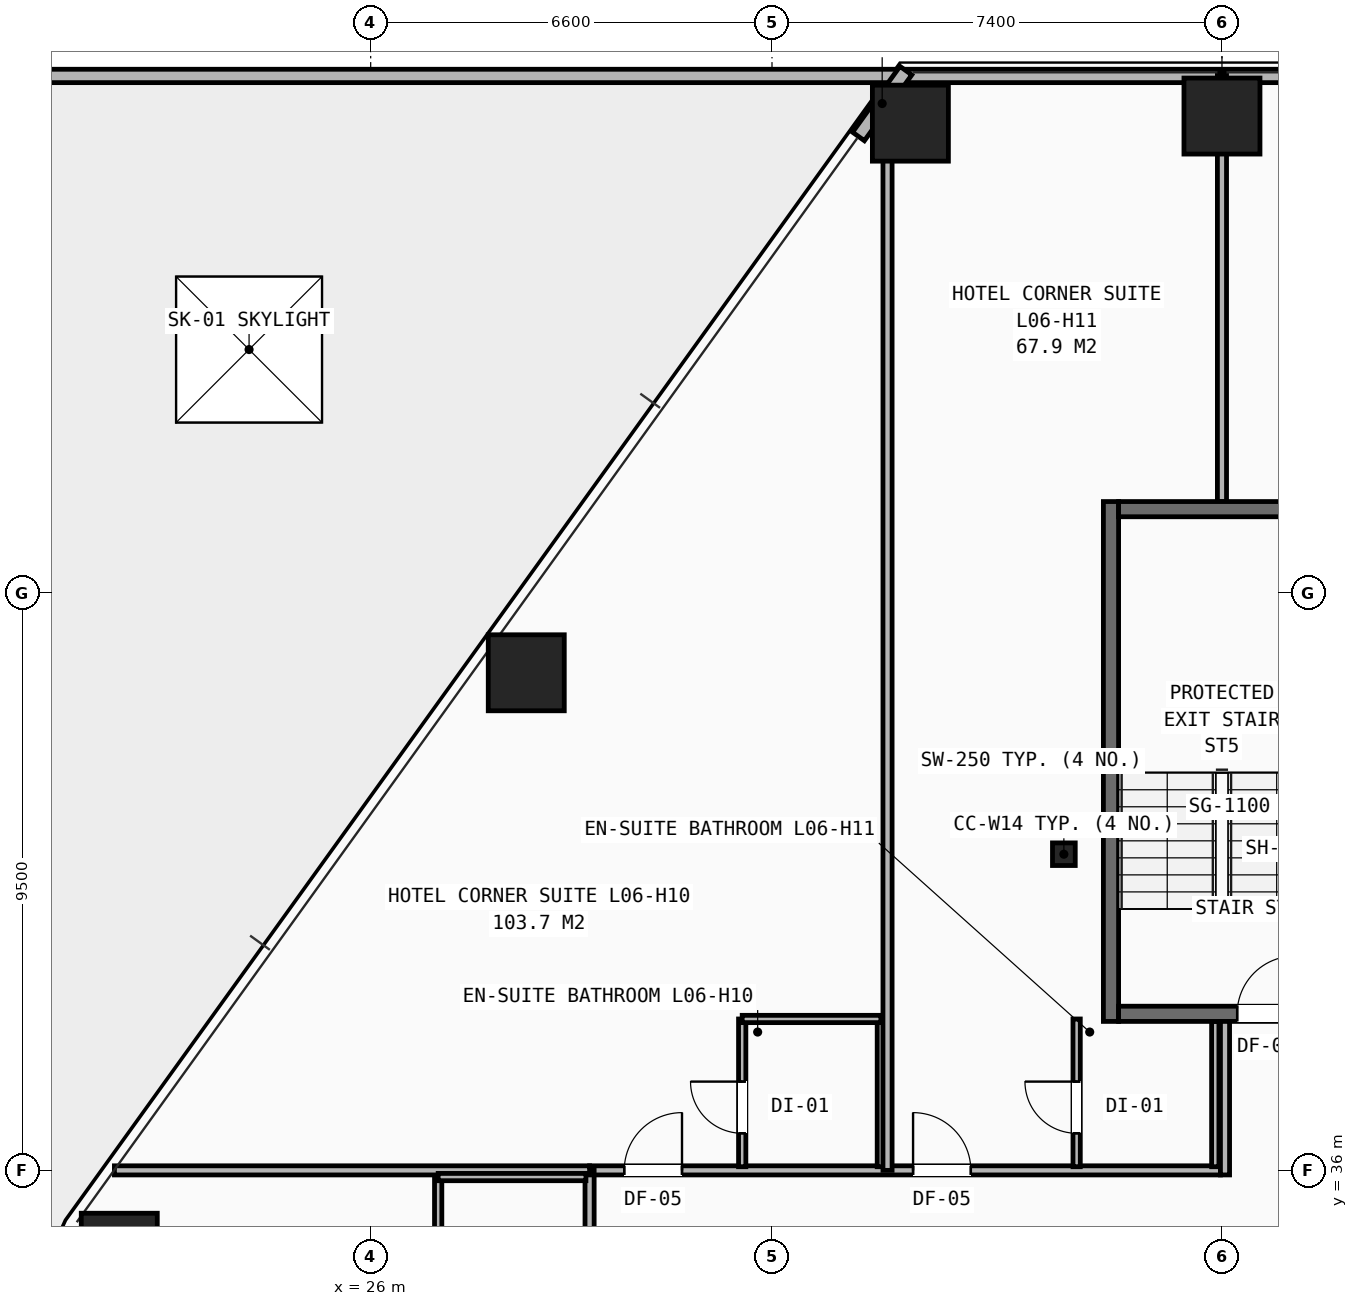
"""IFC4 building model, lengths in metres.
Left out: names, types, materials, properties, quantities, classifications, styles, units other than length and angle.
Written with IfcOpenShell. Run it as: python <this file> out.ifc"""

import sys

from ifc_helpers import new_model, si_unit, direction, frame, frame_2d, origin, origin_2d, place, context, subcontext, project, spatial, rectangle, hollow_rectangle, i_section, extrude, element, fill, save


model = new_model("IFC4")
c1 = context("Model", 3, precision=1e-05, world=origin(), true_north=direction((0.0, 1.0)))
c2 = subcontext(c1, "Body", "Model", "MODEL_VIEW")
j1 = project(units=[si_unit("LENGTHUNIT", "METRE"), si_unit("PLANEANGLEUNIT", "RADIAN")], contexts=[c1])
p1 = place(None, origin())
s1 = spatial("IfcSite", under=j1, at=p1, CompositionType="ELEMENT")
p2 = place(p1, origin())
s2 = spatial("IfcBuilding", under=s1, at=p2, CompositionType="ELEMENT")
p3 = place(p2, frame((0.0, 0.0, 27.2)))
s3 = spatial("IfcBuildingStorey", under=s2, at=p3, CompositionType="ELEMENT", Elevation=27.2)
p4 = place(p3, frame((37.4, 41.2, 0.0), z_axis=(0.0, 0.0, 1.0), x_axis=(1.0, 0.0, 0.0)))
e1 = element("IfcColumn", 1, at=p4, inside=s3, PredefinedType="COLUMN", context=c2, shape_type="SweptSolid", body=[
    extrude(i_section(OverallWidth=0.374, OverallDepth=0.372, WebThickness=0.016, FlangeThickness=0.026, at=origin_2d()), origin(), (0.0, 0.0, 1.0), 3.2),
])
for number, where, z_axis, x_axis in (
    (2, (40.0, 53.34, 0.0), (0.0, 0.0, 1.0), (1.0, 0.0, 0.0)),
    (3, (34.876, 53.223, 0.0), (0.0, 0.0, 1.0), (1.0, 0.0, 0.0)),
    (4, (28.559, 44.184, 0.0), (0.0, 0.0, 1.0), (1.0, 0.0, 0.0)),
    (5, (21.865, 34.67, 0.0), (0.0, 0.0, 1.0), (1.0, 0.0, 0.0)),
):
    element("IfcColumn", number, at=place(p3, frame(where, z_axis=z_axis, x_axis=x_axis)), inside=s3, PredefinedType="COLUMN", context=c2, shape_type="SweptSolid", body=[
        extrude(hollow_rectangle(XDim=1.25, YDim=1.25, WallThickness=0.08, at=origin_2d()), origin(), (0.0, 0.0, 1.0), 3.2),
    ])
p5 = place(p3, frame((74.5, 54.0, 0.0), z_axis=(0.0, 0.0, 1.0), x_axis=(-1.0, 0.0, 0.0)))
e6 = element("IfcWall", 6, at=p5, inside=s3, PredefinedType="PARAPET", context=c2, shape_type="SweptSolid", body=[
    extrude(rectangle(XDim=69.0, YDim=0.22, at=frame_2d((34.5, 0.0))), origin(), (0.0, 0.0, 1.0), 1.15),
])
p6 = place(p3, frame((34.802, 54.088, 0.0), z_axis=(0.0, 0.0, 1.0), x_axis=(-0.584193864266, -0.811614150292, 0.0)))
e7 = element("IfcWall", 7, at=p6, inside=s3, PredefinedType="SHEAR", context=c2, shape_type="SweptSolid", body=[
    extrude(rectangle(XDim=1.334, YDim=0.24, at=frame_2d((0.667, 0.0))), origin(), (0.0, 0.0, 1.0), 2.263),
])
p7 = place(p3, frame((29.6, 36.0, 0.0), z_axis=(0.0, 0.0, 1.0), x_axis=(1.0, 0.0, 0.0)))
e8 = element("IfcWall", 8, at=p7, inside=s3, PredefinedType="PARTITIONING", context=c2, shape_type="SweptSolid", body=[
    extrude(rectangle(XDim=10.375, YDim=0.15, at=frame_2d((5.188, 0.0))), origin(), (0.0, 0.0, 1.0), 2.98),
])
p8 = place(p7, frame((0.57, 0.0, 0.0)))
e9 = element("IfcOpeningElement", 9, at=p8, cuts=e8, PredefinedType="OPENING", context=c2, shape_type="SweptSolid", body=[
    extrude(rectangle(XDim=0.95, YDim=2.1, at=frame_2d((0.475, 1.05))), frame((0.0, 0.085, 0.0), z_axis=(0.0, -1.0, 0.0), x_axis=(1.0, 0.0, 0.0)), (0.0, 0.0, 1.0), 0.17),
])
p9 = place(p7, frame((5.32, 0.0, 0.0)))
e10 = element("IfcOpeningElement", 10, at=p9, cuts=e8, PredefinedType="OPENING", context=c2, shape_type="SweptSolid", body=[
    extrude(rectangle(XDim=0.95, YDim=2.1, at=frame_2d((0.475, 1.05))), frame((0.0, 0.085, 0.0), z_axis=(0.0, -1.0, 0.0), x_axis=(1.0, 0.0, 0.0)), (0.0, 0.0, 1.0), 0.17),
])
p10 = place(p3, frame((29.6, 14.1, 0.0), z_axis=(0.0, 0.0, 1.0), x_axis=(0.0, 1.0, 0.0)))
e11 = element("IfcWall", 11, at=p10, inside=s3, PredefinedType="PARTITIONING", context=c2, shape_type="SweptSolid", body=[
    extrude(rectangle(XDim=21.9, YDim=0.15, at=frame_2d((10.95, 0.0))), origin(), (0.0, 0.0, 1.0), 2.431),
])
p11 = place(p10, frame((0.42, 0.0, 0.0)))
e12 = element("IfcOpeningElement", 12, at=p11, cuts=e11, PredefinedType="OPENING", context=c2, shape_type="SweptSolid", body=[
    extrude(rectangle(XDim=0.95, YDim=2.1, at=frame_2d((0.475, 1.05))), frame((0.0, 0.085, 0.0), z_axis=(0.0, -1.0, 0.0), x_axis=(1.0, 0.0, 0.0)), (0.0, 0.0, 1.0), 0.17),
])
p12 = place(p10, frame((6.82, 0.0, 0.0)))
e13 = element("IfcOpeningElement", 13, at=p12, cuts=e11, PredefinedType="OPENING", context=c2, shape_type="SweptSolid", body=[
    extrude(rectangle(XDim=0.95, YDim=2.1, at=frame_2d((0.475, 1.05))), frame((0.0, 0.085, 0.0), z_axis=(0.0, -1.0, 0.0), x_axis=(1.0, 0.0, 0.0)), (0.0, 0.0, 1.0), 0.17),
])
p13 = place(p10, frame((14.32, 0.0, 0.0)))
e14 = element("IfcOpeningElement", 14, at=p13, cuts=e11, PredefinedType="OPENING", context=c2, shape_type="SweptSolid", body=[
    extrude(rectangle(XDim=0.95, YDim=2.1, at=frame_2d((0.475, 1.05))), frame((0.0, 0.085, 0.0), z_axis=(0.0, -1.0, 0.0), x_axis=(1.0, 0.0, 0.0)), (0.0, 0.0, 1.0), 0.17),
])
p14 = place(p3, frame((21.786, 36.0, 0.0), z_axis=(0.0, 0.0, 1.0), x_axis=(1.0, 0.0, 0.0)))
e15 = element("IfcWall", 15, at=p14, inside=s3, PredefinedType="PARTITIONING", context=c2, shape_type="SweptSolid", body=[
    extrude(rectangle(XDim=7.814, YDim=0.15, at=frame_2d((3.907, 0.0))), origin(), (0.0, 0.0, 1.0), 2.268),
])
p15 = place(p3, frame((27.11, 33.61, 0.0), z_axis=(0.0, 0.0, 1.0), x_axis=(0.0, 1.0, 0.0)))
e16 = element("IfcWall", 16, at=p15, inside=s3, PredefinedType="PARTITIONING", context=c2, shape_type="SweptSolid", body=[
    extrude(rectangle(XDim=2.28, YDim=0.12, at=frame_2d((1.14, 0.0))), origin(), (0.0, 0.0, 1.0), 2.513),
])
p16 = place(p3, frame((27.11, 35.89, 0.0), z_axis=(0.0, 0.0, 1.0), x_axis=(1.0, 0.0, 0.0)))
e17 = element("IfcWall", 17, at=p16, inside=s3, PredefinedType="PARTITIONING", context=c2, shape_type="SweptSolid", body=[
    extrude(rectangle(XDim=2.43, YDim=0.12, at=frame_2d((1.215, 0.0))), origin(), (0.0, 0.0, 1.0), 2.513),
])
p17 = place(p3, frame((32.11, 36.06, 0.0), z_axis=(0.0, 0.0, 1.0), x_axis=(0.0, 1.0, 0.0)))
e18 = element("IfcWall", 18, at=p17, inside=s3, PredefinedType="PARTITIONING", context=c2, shape_type="SweptSolid", body=[
    extrude(rectangle(XDim=2.43, YDim=0.12, at=frame_2d((1.215, 0.0))), origin(), (0.0, 0.0, 1.0), 2.98),
])
p18 = place(p17, frame((0.55, 0.0, 0.0)))
e19 = element("IfcOpeningElement", 19, at=p18, cuts=e18, PredefinedType="OPENING", context=c2, shape_type="SweptSolid", body=[
    extrude(rectangle(XDim=0.85, YDim=2.05, at=frame_2d((0.425, 1.025))), frame((0.0, 0.07, 0.0), z_axis=(0.0, -1.0, 0.0), x_axis=(1.0, 0.0, 0.0)), (0.0, 0.0, 1.0), 0.14),
])
p19 = place(p3, frame((34.39, 36.06, 0.0), z_axis=(0.0, 0.0, 1.0), x_axis=(0.0, 1.0, 0.0)))
e20 = element("IfcWall", 20, at=p19, inside=s3, PredefinedType="PARTITIONING", context=c2, shape_type="SweptSolid", body=[
    extrude(rectangle(XDim=2.43, YDim=0.12, at=frame_2d((1.215, 0.0))), origin(), (0.0, 0.0, 1.0), 2.98),
])
p20 = place(p3, frame((32.11, 38.49, 0.0), z_axis=(0.0, 0.0, 1.0), x_axis=(1.0, 0.0, 0.0)))
e21 = element("IfcWall", 21, at=p20, inside=s3, PredefinedType="PARTITIONING", context=c2, shape_type="SweptSolid", body=[
    extrude(rectangle(XDim=2.28, YDim=0.12, at=frame_2d((1.14, 0.0))), origin(), (0.0, 0.0, 1.0), 2.98),
])
p21 = place(p3, frame((34.5, 36.0, 0.0), z_axis=(0.0, 0.0, 1.0), x_axis=(0.0, 1.0, 0.0)))
e22 = element("IfcWall", 22, at=p21, inside=s3, PredefinedType="PARTITIONING", context=c2, shape_type="SweptSolid", body=[
    extrude(rectangle(XDim=17.66, YDim=0.15, at=frame_2d((8.83, 0.0))), origin(), (0.0, 0.0, 1.0), 2.268),
])
p22 = place(p3, frame((37.61, 36.06, 0.0), z_axis=(0.0, 0.0, 1.0), x_axis=(0.0, 1.0, 0.0)))
e23 = element("IfcWall", 23, at=p22, inside=s3, PredefinedType="PARTITIONING", context=c2, shape_type="SweptSolid", body=[
    extrude(rectangle(XDim=2.43, YDim=0.12, at=frame_2d((1.215, 0.0))), origin(), (0.0, 0.0, 1.0), 2.98),
])
p23 = place(p22, frame((0.55, 0.0, 0.0)))
e24 = element("IfcOpeningElement", 24, at=p23, cuts=e23, PredefinedType="OPENING", context=c2, shape_type="SweptSolid", body=[
    extrude(rectangle(XDim=0.85, YDim=2.05, at=frame_2d((0.425, 1.025))), frame((0.0, 0.07, 0.0), z_axis=(0.0, -1.0, 0.0), x_axis=(1.0, 0.0, 0.0)), (0.0, 0.0, 1.0), 0.14),
])
p24 = place(p3, frame((39.89, 36.06, 0.0), z_axis=(0.0, 0.0, 1.0), x_axis=(0.0, 1.0, 0.0)))
e25 = element("IfcWall", 25, at=p24, inside=s3, PredefinedType="PARTITIONING", context=c2, shape_type="SweptSolid", body=[
    extrude(rectangle(XDim=2.39, YDim=0.12, at=frame_2d((1.195, 0.0))), origin(), (0.0, 0.0, 1.0), 2.98),
])
p25 = place(p3, frame((40.0, 47.0, 0.0), z_axis=(0.0, 0.0, 1.0), x_axis=(0.0, 1.0, 0.0)))
e26 = element("IfcWall", 26, at=p25, inside=s3, PredefinedType="PARTITIONING", context=c2, shape_type="SweptSolid", body=[
    extrude(rectangle(XDim=7.055, YDim=0.15, at=frame_2d((3.528, 0.0))), origin(), (0.0, 0.0, 1.0), 2.268),
])
p26 = place(p3, frame((38.175, 38.45, 0.0), z_axis=(0.0, 0.0, 1.0), x_axis=(0.0, 1.0, 0.0)))
e27 = element("IfcWall", 27, at=p26, inside=s3, PredefinedType="SHEAR", context=c2, shape_type="SweptSolid", body=[
    extrude(rectangle(XDim=8.55, YDim=0.25, at=frame_2d((4.275, 0.0))), origin(), (0.0, 0.0, 1.0), 2.98),
])
p27 = place(p3, frame((38.3, 38.575, 0.0), z_axis=(0.0, 0.0, 1.0), x_axis=(1.0, 0.0, 0.0)))
e28 = element("IfcWall", 28, at=p27, inside=s3, PredefinedType="SHEAR", context=c2, shape_type="SweptSolid", body=[
    extrude(rectangle(XDim=3.4, YDim=0.25, at=frame_2d((1.7, 0.0))), origin(), (0.0, 0.0, 1.0), 2.98),
])
p28 = place(p27, frame((1.95, 0.0, 0.0)))
e29 = element("IfcOpeningElement", 29, at=p28, cuts=e28, PredefinedType="OPENING", context=c2, shape_type="SweptSolid", body=[
    extrude(rectangle(XDim=0.95, YDim=2.1, at=frame_2d((0.475, 1.05))), frame((0.0, 0.135, 0.0), z_axis=(0.0, -1.0, 0.0), x_axis=(1.0, 0.0, 0.0)), (0.0, 0.0, 1.0), 0.27),
])
p29 = place(p3, frame((38.3, 46.875, 0.0), z_axis=(0.0, 0.0, 1.0), x_axis=(1.0, 0.0, 0.0)))
e30 = element("IfcWall", 30, at=p29, inside=s3, PredefinedType="SHEAR", context=c2, shape_type="SweptSolid", body=[
    extrude(rectangle(XDim=3.4, YDim=0.25, at=frame_2d((1.7, 0.0))), origin(), (0.0, 0.0, 1.0), 2.98),
])
p30 = place(p3, frame((40.05, 35.925, 0.0), z_axis=(0.0, 0.0, 1.0), x_axis=(0.0, 1.0, 0.0)))
e31 = element("IfcWall", 31, at=p30, inside=s3, PredefinedType="PARTITIONING", context=c2, shape_type="SweptSolid", body=[
    extrude(rectangle(XDim=2.525, YDim=0.15, at=frame_2d((1.262, 0.0))), origin(), (0.0, 0.0, 1.0), 2.98),
])
p31 = place(p3, frame((0.0, 0.0, -0.3)))
p32 = place(p31, frame((24.0, 49.5, 0.0)))
p33 = place(p32, frame((0.0, 0.0, 0.25)))
e32 = element("IfcWindow", 32, at=p33, inside=s3, PartitioningType="SINGLE_PANEL", PredefinedType="SKYLIGHT", context=c2, shape_type="SweptSolid", body=[
    extrude(rectangle(XDim=2.4, YDim=2.4, at=origin_2d()), origin(), (0.0, 0.0, 1.0), 0.05),
])
p34 = place(p8, origin())
e33 = element("IfcDoor", 33, at=p34, inside=s3, OperationType="SINGLE_SWING_RIGHT", PredefinedType="DOOR", context=c2, shape_type="SweptSolid", body=[
    extrude(rectangle(XDim=0.95, YDim=2.1, at=frame_2d((0.475, 1.05))), frame((0.0, 0.025, 0.0), z_axis=(0.0, -1.0, 0.0), x_axis=(1.0, 0.0, 0.0)), (0.0, 0.0, 1.0), 0.05),
])
fill(e9, e33)
p35 = place(p18, origin())
e34 = element("IfcDoor", 34, at=p35, inside=s3, OperationType="SINGLE_SWING_RIGHT", PredefinedType="DOOR", context=c2, shape_type="SweptSolid", body=[
    extrude(rectangle(XDim=0.85, YDim=2.05, at=frame_2d((0.425, 1.025))), frame((0.0, 0.025, 0.0), z_axis=(0.0, -1.0, 0.0), x_axis=(1.0, 0.0, 0.0)), (0.0, 0.0, 1.0), 0.05),
])
fill(e19, e34)
p36 = place(p9, origin())
e35 = element("IfcDoor", 35, at=p36, inside=s3, OperationType="SINGLE_SWING_LEFT", PredefinedType="DOOR", context=c2, shape_type="SweptSolid", body=[
    extrude(rectangle(XDim=0.95, YDim=2.1, at=frame_2d((0.475, 1.05))), frame((0.0, 0.025, 0.0), z_axis=(0.0, -1.0, 0.0), x_axis=(1.0, 0.0, 0.0)), (0.0, 0.0, 1.0), 0.05),
])
fill(e10, e35)
p37 = place(p23, origin())
e36 = element("IfcDoor", 36, at=p37, inside=s3, OperationType="SINGLE_SWING_RIGHT", PredefinedType="DOOR", context=c2, shape_type="SweptSolid", body=[
    extrude(rectangle(XDim=0.85, YDim=2.05, at=frame_2d((0.425, 1.025))), frame((0.0, 0.025, 0.0), z_axis=(0.0, -1.0, 0.0), x_axis=(1.0, 0.0, 0.0)), (0.0, 0.0, 1.0), 0.05),
])
fill(e24, e36)
p38 = place(p28, origin())
e37 = element("IfcDoor", 37, at=p38, inside=s3, OperationType="SINGLE_SWING_RIGHT", PredefinedType="DOOR", context=c2, shape_type="SweptSolid", body=[
    extrude(rectangle(XDim=0.95, YDim=2.1, at=frame_2d((0.475, 1.05))), frame((0.0, 0.025, 0.0), z_axis=(0.0, -1.0, 0.0), x_axis=(1.0, 0.0, 0.0)), (0.0, 0.0, 1.0), 0.05),
])
fill(e29, e37)
save(model, sys.argv[1])
